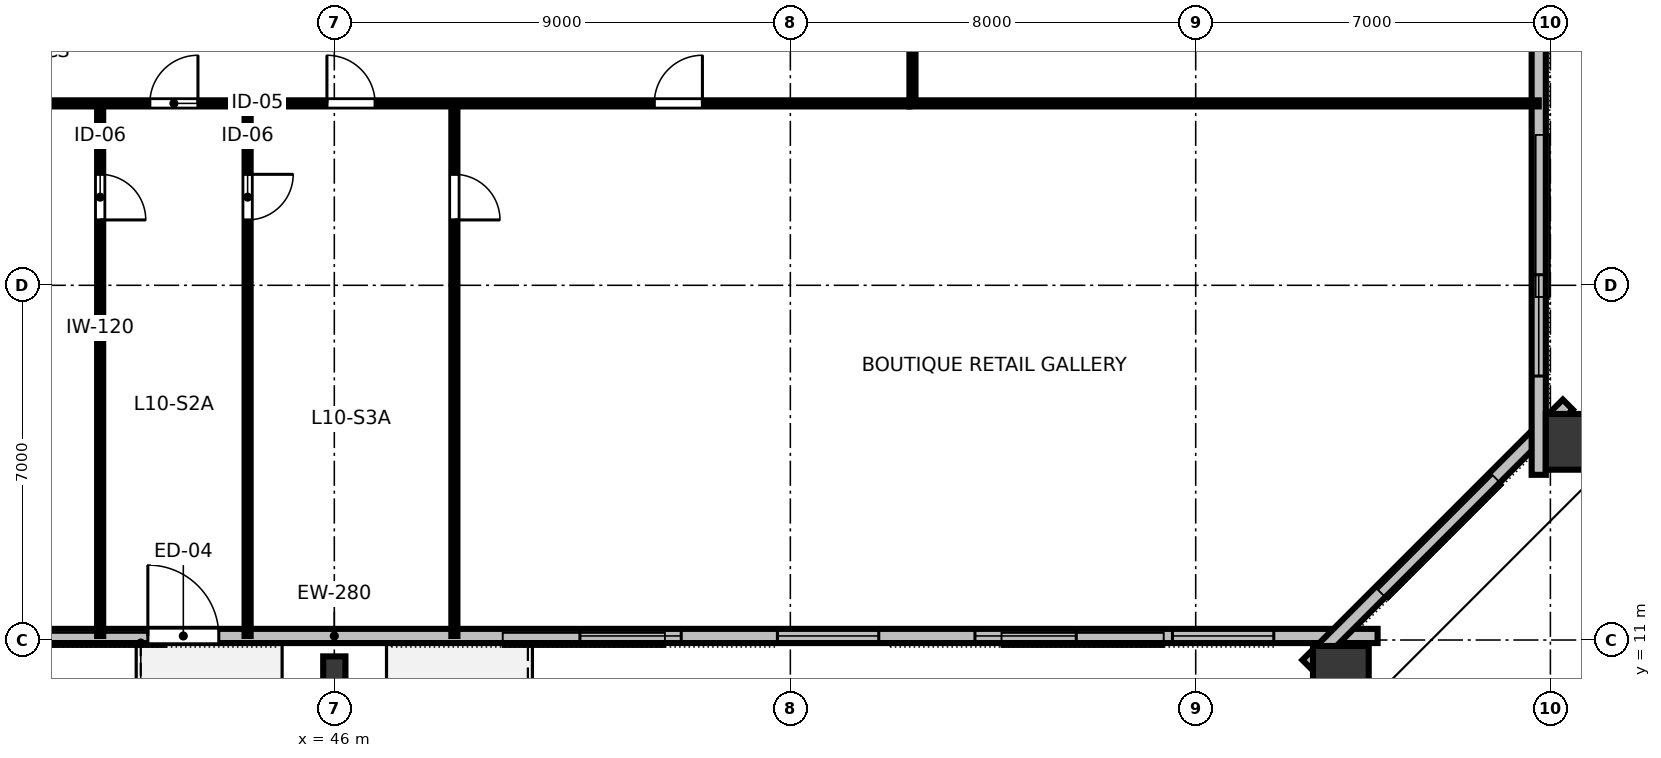
"""IFC4 building model, lengths in metres.
Left out: names, types, materials, properties, quantities, classifications, styles, units other than length and angle.
Written with IfcOpenShell. Run it as: python <this file> out.ifc"""

import sys

from ifc_helpers import new_model, si_unit, direction, frame, frame_2d, origin, origin_2d, place, context, subcontext, project, spatial, rectangle, hollow_rectangle, i_section, extrude, element, fill, save


model = new_model("IFC4")
c1 = context("Model", 3, precision=1e-05, world=origin(), true_north=direction((0.0, 1.0)))
c2 = subcontext(c1, "Body", "Model", "MODEL_VIEW")
j1 = project(units=[si_unit("LENGTHUNIT", "METRE"), si_unit("PLANEANGLEUNIT", "RADIAN")], contexts=[c1])
p1 = place(None, origin())
s1 = spatial("IfcSite", under=j1, at=p1, CompositionType="ELEMENT")
p2 = place(p1, origin())
s2 = spatial("IfcBuilding", under=s1, at=p2, CompositionType="ELEMENT")
p3 = place(p2, frame((0.0, 0.0, 42.4)))
s3 = spatial("IfcBuildingStorey", under=s2, at=p3, CompositionType="ELEMENT", Elevation=42.4)
p4 = place(p3, frame((46.0, 10.42, 0.0), z_axis=(0.0, 0.0, 1.0), x_axis=(1.0, 0.0, 0.0)))
e1 = element("IfcColumn", 1, at=p4, inside=s3, PredefinedType="COLUMN", context=c2, shape_type="SweptSolid", body=[
    extrude(i_section(OverallWidth=0.439, OverallDepth=0.514, WebThickness=0.06, FlangeThickness=0.097, FilletRadius=0.025, at=origin_2d()), origin(), (0.0, 0.0, 1.0), 3.148),
])
for number, where, z_axis, x_axis in (
    (2, (65.865, 10.232, 0.0), (0.0, 0.0, 1.0), (1.0, 0.0, 0.0)),
    (3, (70.559, 14.911, 0.0), (0.0, 0.0, 1.0), (0.0, 1.0, 0.0)),
):
    element("IfcColumn", number, at=place(p3, frame(where, z_axis=z_axis, x_axis=x_axis)), inside=s3, PredefinedType="COLUMN", context=c2, shape_type="SweptSolid", body=[
        extrude(hollow_rectangle(XDim=1.1, YDim=1.3, WallThickness=0.07, at=origin_2d()), origin(), (0.0, 0.0, 1.0), 3.148),
    ])
p5 = place(p3, frame((25.41, 11.08, 0.0), z_axis=(0.0, 0.0, 1.0), x_axis=(1.0, 0.0, 0.0)))
e4 = element("IfcWall", 4, at=p5, inside=s3, PredefinedType="STANDARD", context=c2, shape_type="SweptSolid", body=[
    extrude(rectangle(XDim=41.18, YDim=0.28, at=frame_2d((20.59, 0.0))), origin(), (0.0, 0.0, 1.0), 3.15),
])
p6 = place(p5, frame((16.91, 0.0, 0.0)))
e5 = element("IfcOpeningElement", 5, at=p6, cuts=e4, PredefinedType="OPENING", context=c2, shape_type="SweptSolid", body=[
    extrude(rectangle(XDim=1.4, YDim=2.15, at=frame_2d((0.7, 1.075))), frame((0.0, 0.15, 0.0), z_axis=(0.0, -1.0, 0.0), x_axis=(1.0, 0.0, 0.0)), (0.0, 0.0, 1.0), 0.3),
])
p7 = place(p5, frame((2.049, 0.0, 0.8)))
e6 = element("IfcOpeningElement", 6, at=p7, cuts=e4, PredefinedType="OPENING", context=c2, shape_type="SweptSolid", body=[
    extrude(rectangle(XDim=2.0, YDim=1.95, at=frame_2d((1.0, 0.975))), frame((0.0, 0.15, 0.0), z_axis=(0.0, -1.0, 0.0), x_axis=(1.0, 0.0, 0.0)), (0.0, 0.0, 1.0), 0.3),
])
p8 = place(p5, frame((5.947, 0.0, 0.8)))
e7 = element("IfcOpeningElement", 7, at=p8, cuts=e4, PredefinedType="OPENING", context=c2, shape_type="SweptSolid", body=[
    extrude(rectangle(XDim=2.0, YDim=1.95, at=frame_2d((1.0, 0.975))), frame((0.0, 0.15, 0.0), z_axis=(0.0, -1.0, 0.0), x_axis=(1.0, 0.0, 0.0)), (0.0, 0.0, 1.0), 0.3),
])
p9 = place(p5, frame((9.845, 0.0, 0.8)))
e8 = element("IfcOpeningElement", 8, at=p9, cuts=e4, PredefinedType="OPENING", context=c2, shape_type="SweptSolid", body=[
    extrude(rectangle(XDim=2.0, YDim=1.95, at=frame_2d((1.0, 0.975))), frame((0.0, 0.15, 0.0), z_axis=(0.0, -1.0, 0.0), x_axis=(1.0, 0.0, 0.0)), (0.0, 0.0, 1.0), 0.3),
])
p10 = place(p5, frame((25.437, 0.0, 0.8)))
e9 = element("IfcOpeningElement", 9, at=p10, cuts=e4, PredefinedType="OPENING", context=c2, shape_type="SweptSolid", body=[
    extrude(rectangle(XDim=2.0, YDim=1.95, at=frame_2d((1.0, 0.975))), frame((0.0, 0.15, 0.0), z_axis=(0.0, -1.0, 0.0), x_axis=(1.0, 0.0, 0.0)), (0.0, 0.0, 1.0), 0.3),
])
p11 = place(p5, frame((29.335, 0.0, 0.8)))
e10 = element("IfcOpeningElement", 10, at=p11, cuts=e4, PredefinedType="OPENING", context=c2, shape_type="SweptSolid", body=[
    extrude(rectangle(XDim=2.0, YDim=1.95, at=frame_2d((1.0, 0.975))), frame((0.0, 0.15, 0.0), z_axis=(0.0, -1.0, 0.0), x_axis=(1.0, 0.0, 0.0)), (0.0, 0.0, 1.0), 0.3),
])
p12 = place(p5, frame((33.233, 0.0, 0.8)))
e11 = element("IfcOpeningElement", 11, at=p12, cuts=e4, PredefinedType="OPENING", context=c2, shape_type="SweptSolid", body=[
    extrude(rectangle(XDim=2.0, YDim=1.95, at=frame_2d((1.0, 0.975))), frame((0.0, 0.15, 0.0), z_axis=(0.0, -1.0, 0.0), x_axis=(1.0, 0.0, 0.0)), (0.0, 0.0, 1.0), 0.3),
])
p13 = place(p5, frame((37.131, 0.0, 0.8)))
e12 = element("IfcOpeningElement", 12, at=p13, cuts=e4, PredefinedType="OPENING", context=c2, shape_type="SweptSolid", body=[
    extrude(rectangle(XDim=2.0, YDim=1.95, at=frame_2d((1.0, 0.975))), frame((0.0, 0.15, 0.0), z_axis=(0.0, -1.0, 0.0), x_axis=(1.0, 0.0, 0.0)), (0.0, 0.0, 1.0), 0.3),
])
p14 = place(p3, frame((65.205, 10.506, 0.0), z_axis=(0.0, 0.0, 1.0), x_axis=(0.707106781187, 0.707106781187, 0.0)))
e13 = element("IfcWall", 13, at=p14, inside=s3, PredefinedType="STANDARD", context=c2, shape_type="SweptSolid", body=[
    extrude(rectangle(XDim=7.268, YDim=0.28, at=frame_2d((3.634, 0.0))), origin(), (0.0, 0.0, 1.0), 3.15),
])
p15 = place(p3, frame((69.77, 14.26, 0.0), z_axis=(0.0, 0.0, 1.0), x_axis=(0.0, 1.0, 0.0)))
e14 = element("IfcWall", 14, at=p15, inside=s3, PredefinedType="STANDARD", context=c2, shape_type="SweptSolid", body=[
    extrude(rectangle(XDim=35.48, YDim=0.28, at=frame_2d((17.74, 0.0))), origin(), (0.0, 0.0, 1.0), 3.15),
])
p16 = place(p15, frame((1.949, 0.0, 0.8)))
e15 = element("IfcOpeningElement", 15, at=p16, cuts=e14, PredefinedType="OPENING", context=c2, shape_type="SweptSolid", body=[
    extrude(rectangle(XDim=2.0, YDim=1.95, at=frame_2d((1.0, 0.975))), frame((0.0, 0.15, 0.0), z_axis=(0.0, -1.0, 0.0), x_axis=(1.0, 0.0, 0.0)), (0.0, 0.0, 1.0), 0.3),
])
p17 = place(p15, frame((9.344, 0.0, 0.8)))
e16 = element("IfcOpeningElement", 16, at=p17, cuts=e14, PredefinedType="OPENING", context=c2, shape_type="SweptSolid", body=[
    extrude(rectangle(XDim=2.0, YDim=1.95, at=frame_2d((1.0, 0.975))), frame((0.0, 0.15, 0.0), z_axis=(0.0, -1.0, 0.0), x_axis=(1.0, 0.0, 0.0)), (0.0, 0.0, 1.0), 0.3),
])
p18 = place(p15, frame((13.042, 0.0, 0.8)))
e17 = element("IfcOpeningElement", 17, at=p18, cuts=e14, PredefinedType="OPENING", context=c2, shape_type="SweptSolid", body=[
    extrude(rectangle(XDim=2.0, YDim=1.95, at=frame_2d((1.0, 0.975))), frame((0.0, 0.15, 0.0), z_axis=(0.0, -1.0, 0.0), x_axis=(1.0, 0.0, 0.0)), (0.0, 0.0, 1.0), 0.3),
])
p19 = place(p15, frame((20.438, 0.0, 0.8)))
e18 = element("IfcOpeningElement", 18, at=p19, cuts=e14, PredefinedType="OPENING", context=c2, shape_type="SweptSolid", body=[
    extrude(rectangle(XDim=2.0, YDim=1.95, at=frame_2d((1.0, 0.975))), frame((0.0, 0.15, 0.0), z_axis=(0.0, -1.0, 0.0), x_axis=(1.0, 0.0, 0.0)), (0.0, 0.0, 1.0), 0.3),
])
p20 = place(p15, frame((24.135, 0.0, 0.8)))
e19 = element("IfcOpeningElement", 19, at=p20, cuts=e14, PredefinedType="OPENING", context=c2, shape_type="SweptSolid", body=[
    extrude(rectangle(XDim=2.0, YDim=1.95, at=frame_2d((1.0, 0.975))), frame((0.0, 0.15, 0.0), z_axis=(0.0, -1.0, 0.0), x_axis=(1.0, 0.0, 0.0)), (0.0, 0.0, 1.0), 0.3),
])
p21 = place(p15, frame((31.531, 0.0, 0.8)))
e20 = element("IfcOpeningElement", 20, at=p21, cuts=e14, PredefinedType="OPENING", context=c2, shape_type="SweptSolid", body=[
    extrude(rectangle(XDim=2.0, YDim=1.95, at=frame_2d((1.0, 0.975))), frame((0.0, 0.15, 0.0), z_axis=(0.0, -1.0, 0.0), x_axis=(1.0, 0.0, 0.0)), (0.0, 0.0, 1.0), 0.3),
])
p22 = place(p3, frame((41.379, 21.59, 0.0), z_axis=(0.0, 0.0, 1.0), x_axis=(0.0, -1.0, 0.0)))
e21 = element("IfcWall", 21, at=p22, inside=s3, PredefinedType="PARTITIONING", context=c2, shape_type="SweptSolid", body=[
    extrude(rectangle(XDim=10.51, YDim=0.12, at=frame_2d((5.255, 0.0))), origin(), (0.0, 0.0, 1.0), 2.43),
])
p23 = place(p22, frame((1.4, 0.0, 0.0)))
e22 = element("IfcOpeningElement", 22, at=p23, cuts=e21, PredefinedType="OPENING", context=c2, shape_type="SweptSolid", body=[
    extrude(rectangle(XDim=0.9, YDim=2.15, at=frame_2d((0.45, 1.075))), frame((0.0, 0.07, 0.0), z_axis=(0.0, -1.0, 0.0), x_axis=(1.0, 0.0, 0.0)), (0.0, 0.0, 1.0), 0.14),
])
p24 = place(p3, frame((44.289, 21.59, 0.0), z_axis=(0.0, 0.0, 1.0), x_axis=(0.0, -1.0, 0.0)))
e23 = element("IfcWall", 23, at=p24, inside=s3, PredefinedType="PARTITIONING", context=c2, shape_type="SweptSolid", body=[
    extrude(rectangle(XDim=10.51, YDim=0.12, at=frame_2d((5.255, 0.0))), origin(), (0.0, 0.0, 1.0), 2.43),
])
p25 = place(p24, frame((1.4, 0.0, 0.0)))
e24 = element("IfcOpeningElement", 24, at=p25, cuts=e23, PredefinedType="OPENING", context=c2, shape_type="SweptSolid", body=[
    extrude(rectangle(XDim=0.9, YDim=2.15, at=frame_2d((0.45, 1.075))), frame((0.0, 0.07, 0.0), z_axis=(0.0, -1.0, 0.0), x_axis=(1.0, 0.0, 0.0)), (0.0, 0.0, 1.0), 0.14),
])
p26 = place(p3, frame((48.37, 21.59, 0.0), z_axis=(0.0, 0.0, 1.0), x_axis=(0.0, -1.0, 0.0)))
e25 = element("IfcWall", 25, at=p26, inside=s3, PredefinedType="PARTITIONING", context=c2, shape_type="SweptSolid", body=[
    extrude(rectangle(XDim=10.51, YDim=0.12, at=frame_2d((5.255, 0.0))), origin(), (0.0, 0.0, 1.0), 2.43),
])
p27 = place(p26, frame((1.4, 0.0, 0.0)))
e26 = element("IfcOpeningElement", 26, at=p27, cuts=e25, PredefinedType="OPENING", context=c2, shape_type="SweptSolid", body=[
    extrude(rectangle(XDim=0.9, YDim=2.15, at=frame_2d((0.45, 1.075))), frame((0.0, 0.07, 0.0), z_axis=(0.0, -1.0, 0.0), x_axis=(1.0, 0.0, 0.0)), (0.0, 0.0, 1.0), 0.14),
])
p28 = place(p3, frame((34.65, 21.59, 0.0), z_axis=(0.0, 0.0, 1.0), x_axis=(1.0, 0.0, 0.0)))
e27 = element("IfcWall", 27, at=p28, inside=s3, PredefinedType="PARTITIONING", context=c2, shape_type="SweptSolid", body=[
    extrude(rectangle(XDim=22.7, YDim=0.12, at=frame_2d((11.35, 0.0))), origin(), (0.0, 0.0, 1.0), 2.43),
])
p29 = place(p28, frame((2.959, 0.0, 0.0)))
e28 = element("IfcOpeningElement", 28, at=p29, cuts=e27, PredefinedType="OPENING", context=c2, shape_type="SweptSolid", body=[
    extrude(rectangle(XDim=0.95, YDim=2.15, at=frame_2d((0.475, 1.075))), frame((0.0, 0.07, 0.0), z_axis=(0.0, -1.0, 0.0), x_axis=(1.0, 0.0, 0.0)), (0.0, 0.0, 1.0), 0.14),
])
p30 = place(p28, frame((7.709, 0.0, 0.0)))
e29 = element("IfcOpeningElement", 29, at=p30, cuts=e27, PredefinedType="OPENING", context=c2, shape_type="SweptSolid", body=[
    extrude(rectangle(XDim=0.95, YDim=2.15, at=frame_2d((0.475, 1.075))), frame((0.0, 0.07, 0.0), z_axis=(0.0, -1.0, 0.0), x_axis=(1.0, 0.0, 0.0)), (0.0, 0.0, 1.0), 0.14),
])
p31 = place(p28, frame((11.204, 0.0, 0.0)))
e30 = element("IfcOpeningElement", 30, at=p31, cuts=e27, PredefinedType="OPENING", context=c2, shape_type="SweptSolid", body=[
    extrude(rectangle(XDim=0.95, YDim=2.15, at=frame_2d((0.475, 1.075))), frame((0.0, 0.07, 0.0), z_axis=(0.0, -1.0, 0.0), x_axis=(1.0, 0.0, 0.0)), (0.0, 0.0, 1.0), 0.14),
])
p32 = place(p28, frame((17.665, 0.0, 0.0)))
e31 = element("IfcOpeningElement", 31, at=p32, cuts=e27, PredefinedType="OPENING", context=c2, shape_type="SweptSolid", body=[
    extrude(rectangle(XDim=0.95, YDim=2.15, at=frame_2d((0.475, 1.075))), frame((0.0, 0.07, 0.0), z_axis=(0.0, -1.0, 0.0), x_axis=(1.0, 0.0, 0.0)), (0.0, 0.0, 1.0), 0.14),
])
p33 = place(p3, frame((57.41, 21.65, 0.0), z_axis=(0.0, 0.0, 1.0), x_axis=(0.0, 1.0, 0.0)))
e32 = element("IfcWall", 32, at=p33, inside=s3, PredefinedType="PARTITIONING", context=c2, shape_type="SweptSolid", body=[
    extrude(rectangle(XDim=20.7, YDim=0.12, at=frame_2d((10.35, 0.0))), origin(), (0.0, 0.0, 1.0), 2.43),
])
p34 = place(p33, frame((9.875, 0.0, 0.0)))
e33 = element("IfcOpeningElement", 33, at=p34, cuts=e32, PredefinedType="OPENING", context=c2, shape_type="SweptSolid", body=[
    extrude(rectangle(XDim=0.95, YDim=2.15, at=frame_2d((0.475, 1.075))), frame((0.0, 0.07, 0.0), z_axis=(0.0, -1.0, 0.0), x_axis=(1.0, 0.0, 0.0)), (0.0, 0.0, 1.0), 0.14),
])
p35 = place(p3, frame((57.35, 21.59, 0.0), z_axis=(0.0, 0.0, 1.0), x_axis=(1.0, 0.0, 0.0)))
e34 = element("IfcWall", 34, at=p35, inside=s3, PredefinedType="PARTITIONING", context=c2, shape_type="SweptSolid", body=[
    extrude(rectangle(XDim=12.42, YDim=0.12, at=frame_2d((6.21, 0.0))), origin(), (0.0, 0.0, 1.0), 2.43),
])
p36 = place(p6, origin())
e35 = element("IfcDoor", 35, at=p36, inside=s3, OperationType="SINGLE_SWING_LEFT", PredefinedType="DOOR", context=c2, shape_type="SweptSolid", body=[
    extrude(rectangle(XDim=1.4, YDim=2.15, at=frame_2d((0.7, 1.075))), frame((0.0, 0.025, 0.0), z_axis=(0.0, -1.0, 0.0), x_axis=(1.0, 0.0, 0.0)), (0.0, 0.0, 1.0), 0.05),
])
fill(e5, e35)
p37 = place(p10, origin())
e36 = element("IfcWindow", 36, at=p37, inside=s3, PartitioningType="SINGLE_PANEL", PredefinedType="WINDOW", context=c2, shape_type="SweptSolid", body=[
    extrude(rectangle(XDim=2.0, YDim=1.95, at=frame_2d((1.0, 0.975))), frame((0.0, 0.03, 0.0), z_axis=(0.0, -1.0, 0.0), x_axis=(1.0, 0.0, 0.0)), (0.0, 0.0, 1.0), 0.06),
])
fill(e9, e36)
p38 = place(p11, origin())
e37 = element("IfcWindow", 37, at=p38, inside=s3, PartitioningType="SINGLE_PANEL", PredefinedType="WINDOW", context=c2, shape_type="SweptSolid", body=[
    extrude(rectangle(XDim=2.0, YDim=1.95, at=frame_2d((1.0, 0.975))), frame((0.0, 0.03, 0.0), z_axis=(0.0, -1.0, 0.0), x_axis=(1.0, 0.0, 0.0)), (0.0, 0.0, 1.0), 0.06),
])
fill(e10, e37)
p39 = place(p12, origin())
e38 = element("IfcWindow", 38, at=p39, inside=s3, PartitioningType="SINGLE_PANEL", PredefinedType="WINDOW", context=c2, shape_type="SweptSolid", body=[
    extrude(rectangle(XDim=2.0, YDim=1.95, at=frame_2d((1.0, 0.975))), frame((0.0, 0.03, 0.0), z_axis=(0.0, -1.0, 0.0), x_axis=(1.0, 0.0, 0.0)), (0.0, 0.0, 1.0), 0.06),
])
fill(e11, e38)
p40 = place(p13, origin())
e39 = element("IfcWindow", 39, at=p40, inside=s3, PartitioningType="SINGLE_PANEL", PredefinedType="WINDOW", context=c2, shape_type="SweptSolid", body=[
    extrude(rectangle(XDim=2.0, YDim=1.95, at=frame_2d((1.0, 0.975))), frame((0.0, 0.03, 0.0), z_axis=(0.0, -1.0, 0.0), x_axis=(1.0, 0.0, 0.0)), (0.0, 0.0, 1.0), 0.06),
])
fill(e12, e39)
p41 = place(p16, origin())
e40 = element("IfcWindow", 40, at=p41, inside=s3, PartitioningType="SINGLE_PANEL", PredefinedType="WINDOW", context=c2, shape_type="SweptSolid", body=[
    extrude(rectangle(XDim=2.0, YDim=1.95, at=frame_2d((1.0, 0.975))), frame((0.0, 0.03, 0.0), z_axis=(0.0, -1.0, 0.0), x_axis=(1.0, 0.0, 0.0)), (0.0, 0.0, 1.0), 0.06),
])
fill(e15, e40)
p42 = place(p23, origin())
e41 = element("IfcDoor", 41, at=p42, inside=s3, OperationType="SINGLE_SWING_RIGHT", PredefinedType="DOOR", context=c2, shape_type="SweptSolid", body=[
    extrude(rectangle(XDim=0.9, YDim=2.15, at=frame_2d((0.45, 1.075))), frame((0.0, 0.025, 0.0), z_axis=(0.0, -1.0, 0.0), x_axis=(1.0, 0.0, 0.0)), (0.0, 0.0, 1.0), 0.05),
])
fill(e22, e41)
p43 = place(p25, origin())
e42 = element("IfcDoor", 42, at=p43, inside=s3, OperationType="SINGLE_SWING_LEFT", PredefinedType="DOOR", context=c2, shape_type="SweptSolid", body=[
    extrude(rectangle(XDim=0.9, YDim=2.15, at=frame_2d((0.45, 1.075))), frame((0.0, 0.025, 0.0), z_axis=(0.0, -1.0, 0.0), x_axis=(1.0, 0.0, 0.0)), (0.0, 0.0, 1.0), 0.05),
])
fill(e24, e42)
p44 = place(p27, origin())
e43 = element("IfcDoor", 43, at=p44, inside=s3, OperationType="SINGLE_SWING_RIGHT", PredefinedType="DOOR", context=c2, shape_type="SweptSolid", body=[
    extrude(rectangle(XDim=0.9, YDim=2.15, at=frame_2d((0.45, 1.075))), frame((0.0, 0.025, 0.0), z_axis=(0.0, -1.0, 0.0), x_axis=(1.0, 0.0, 0.0)), (0.0, 0.0, 1.0), 0.05),
])
fill(e26, e43)
p45 = place(p30, origin())
e44 = element("IfcDoor", 44, at=p45, inside=s3, OperationType="SINGLE_SWING_RIGHT", PredefinedType="DOOR", context=c2, shape_type="SweptSolid", body=[
    extrude(rectangle(XDim=0.95, YDim=2.15, at=frame_2d((0.475, 1.075))), frame((0.0, 0.025, 0.0), z_axis=(0.0, -1.0, 0.0), x_axis=(1.0, 0.0, 0.0)), (0.0, 0.0, 1.0), 0.05),
])
fill(e29, e44)
p46 = place(p31, origin())
e45 = element("IfcDoor", 45, at=p46, inside=s3, OperationType="SINGLE_SWING_LEFT", PredefinedType="DOOR", context=c2, shape_type="SweptSolid", body=[
    extrude(rectangle(XDim=0.95, YDim=2.15, at=frame_2d((0.475, 1.075))), frame((0.0, 0.025, 0.0), z_axis=(0.0, -1.0, 0.0), x_axis=(1.0, 0.0, 0.0)), (0.0, 0.0, 1.0), 0.05),
])
fill(e30, e45)
p47 = place(p32, origin())
e46 = element("IfcDoor", 46, at=p47, inside=s3, OperationType="SINGLE_SWING_RIGHT", PredefinedType="DOOR", context=c2, shape_type="SweptSolid", body=[
    extrude(rectangle(XDim=0.95, YDim=2.15, at=frame_2d((0.475, 1.075))), frame((0.0, 0.025, 0.0), z_axis=(0.0, -1.0, 0.0), x_axis=(1.0, 0.0, 0.0)), (0.0, 0.0, 1.0), 0.05),
])
fill(e31, e46)
save(model, sys.argv[1])
